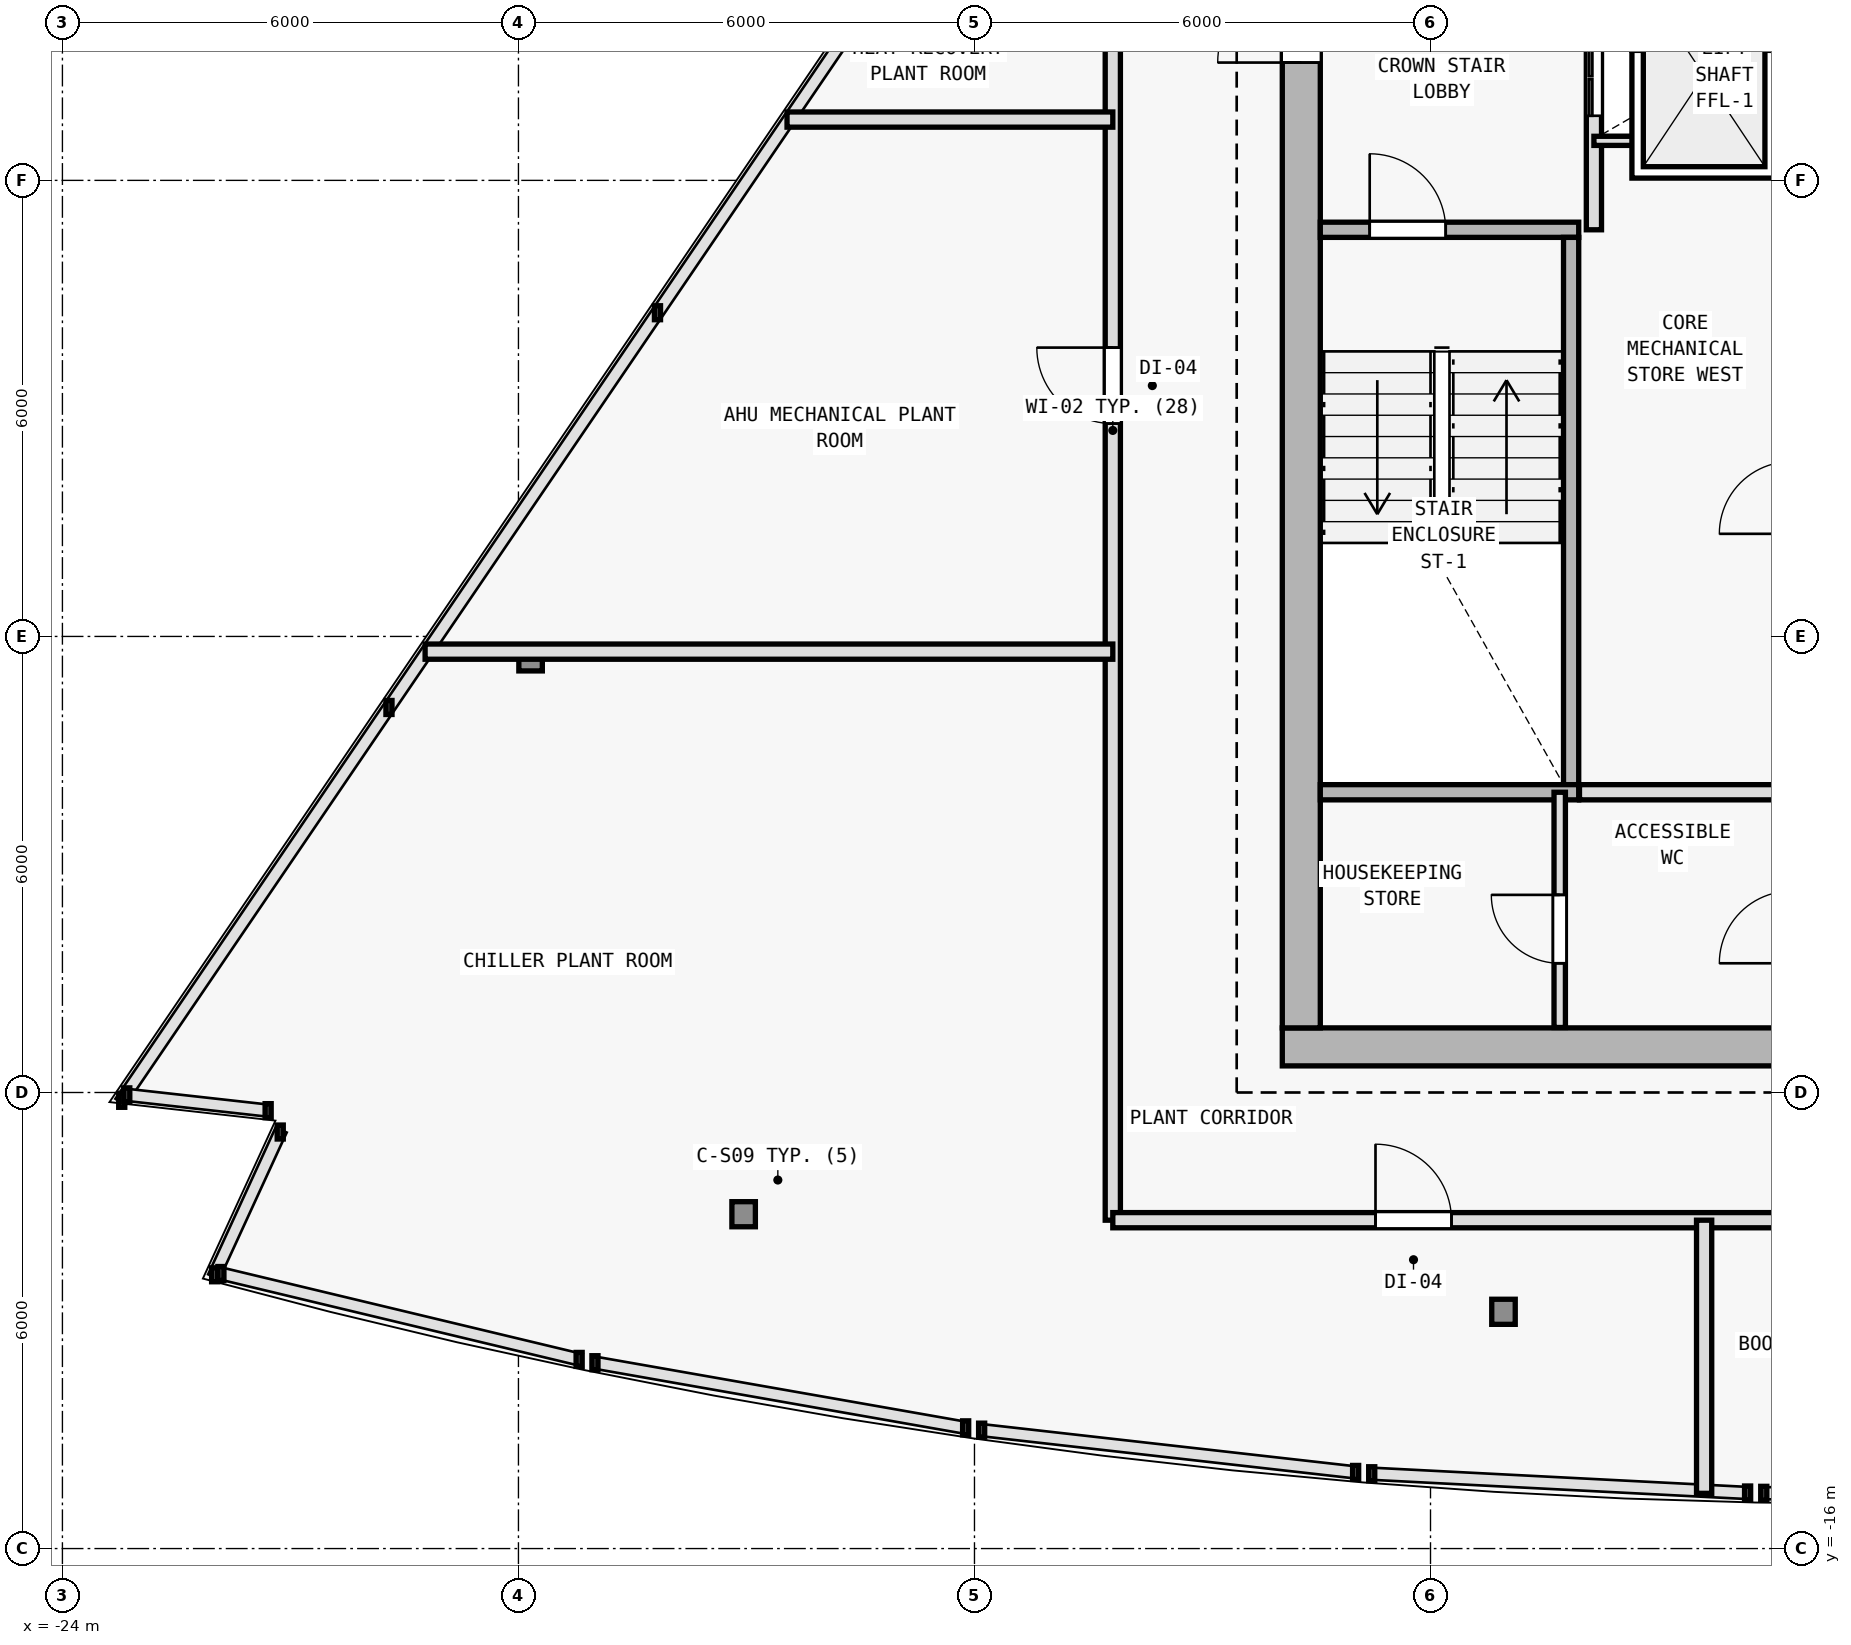
"""IFC4 building model, lengths in metres.
Left out: names, types, materials, properties, quantities, classifications, styles, units other than length and angle.
Written with IfcOpenShell. Run it as: python <this file> out.ifc"""

import sys

from ifc_helpers import new_model, si_unit, direction, frame, frame_2d, origin, origin_2d, place, context, subcontext, project, spatial, rectangle, i_section, extrude, element, fill, save


model = new_model("IFC4")
c1 = context("Model", 3, precision=1e-05, world=origin(), true_north=direction((0.0, 1.0)))
c2 = subcontext(c1, "Body", "Model", "MODEL_VIEW")
j1 = project(units=[si_unit("LENGTHUNIT", "METRE"), si_unit("PLANEANGLEUNIT", "RADIAN")], contexts=[c1])
p1 = place(None, origin())
s1 = spatial("IfcSite", under=j1, at=p1, CompositionType="ELEMENT")
p2 = place(p1, origin())
s2 = spatial("IfcBuilding", under=s1, at=p2, CompositionType="ELEMENT")
p3 = place(p2, frame((0.0, 0.0, 297.6)))
s3 = spatial("IfcBuildingStorey", under=s2, at=p3, CompositionType="ELEMENT", Elevation=297.6)
for number, where, z_axis, x_axis in (
    (1, (-7.7, -9.4, 0.0), (0.0, 0.0, 1.0), (1.0, 0.0, 0.0)),
    (2, (-7.7, 2.0, 0.0), (0.0, 0.0, 1.0), (1.0, 0.0, 0.0)),
):
    element("IfcColumn", number, at=place(p3, frame(where, z_axis=z_axis, x_axis=x_axis)), inside=s3, PredefinedType="COLUMN", context=c2, shape_type="SweptSolid", body=[
        extrude(i_section(OverallWidth=0.374, OverallDepth=0.372, WebThickness=0.012, FlangeThickness=0.02, FilletRadius=0.015, at=origin_2d()), origin(), (0.0, 0.0, 1.0), 3.6),
    ])
for number, where, z_axis, x_axis in (
    (3, (-15.037, -11.602, 0.0), (0.0, 0.0, 1.0), (1.0, 0.0, 0.0)),
    (4, (-5.04, -12.885, 0.0), (0.0, 0.0, 1.0), (1.0, 0.0, 0.0)),
    (5, (-17.84, -4.289, 0.0), (0.0, 0.0, 1.0), (1.0, 0.0, 0.0)),
):
    element("IfcColumn", number, at=place(p3, frame(where, z_axis=z_axis, x_axis=x_axis)), inside=s3, PredefinedType="COLUMN", context=c2, shape_type="SweptSolid", body=[
        extrude(i_section(OverallWidth=0.309, OverallDepth=0.33, WebThickness=0.011, FlangeThickness=0.019, FilletRadius=0.027, at=origin_2d()), origin(), (0.0, 0.0, 1.0), 3.6),
    ])
p4 = place(p3, frame((-7.95, -9.4, 0.0), z_axis=(0.0, 0.0, 1.0), x_axis=(1.0, 0.0, 0.0)))
e6 = element("IfcWall", 6, at=p4, inside=s3, PredefinedType="SHEAR", context=c2, shape_type="SweptSolid", body=[
    extrude(rectangle(XDim=15.9, YDim=0.5, at=frame_2d((7.95, 0.0))), origin(), (0.0, 0.0, 1.0), 3.34),
])
p5 = place(p4, frame((9.6, 0.0, 0.0)))
e7 = element("IfcOpeningElement", 7, at=p5, cuts=e6, PredefinedType="OPENING", context=c2, shape_type="SweptSolid", body=[
    extrude(rectangle(XDim=1.5, YDim=2.2, at=frame_2d((0.75, 1.1))), frame((0.0, 0.26, 0.0), z_axis=(0.0, -1.0, 0.0), x_axis=(1.0, 0.0, 0.0)), (0.0, 0.0, 1.0), 0.52),
])
p6 = place(p3, frame((-7.7, -9.15, 0.0), z_axis=(0.0, 0.0, 1.0), x_axis=(0.0, 1.0, 0.0)))
e8 = element("IfcWall", 8, at=p6, inside=s3, PredefinedType="SHEAR", context=c2, shape_type="SweptSolid", body=[
    extrude(rectangle(XDim=19.1, YDim=0.5, at=frame_2d((9.55, 0.0))), origin(), (0.0, 0.0, 1.0), 3.34),
])
p7 = place(p6, frame((12.7, 0.0, 0.0)))
e9 = element("IfcOpeningElement", 9, at=p7, cuts=e8, PredefinedType="OPENING", context=c2, shape_type="SweptSolid", body=[
    extrude(rectangle(XDim=1.1, YDim=2.15, at=frame_2d((0.55, 1.075))), frame((0.0, 0.26, 0.0), z_axis=(0.0, -1.0, 0.0), x_axis=(1.0, 0.0, 0.0)), (0.0, 0.0, 1.0), 0.52),
])
p8 = place(p3, frame((-7.45, 1.35, 0.0), z_axis=(0.0, 0.0, 1.0), x_axis=(1.0, 0.0, 0.0)))
e10 = element("IfcWall", 10, at=p8, inside=s3, PredefinedType="SOLIDWALL", context=c2, shape_type="SweptSolid", body=[
    extrude(rectangle(XDim=3.4, YDim=0.2, at=frame_2d((1.7, 0.0))), origin(), (0.0, 0.0, 1.0), 3.34),
])
p9 = place(p8, frame((0.65, 0.0, 0.0)))
e11 = element("IfcOpeningElement", 11, at=p9, cuts=e10, PredefinedType="OPENING", context=c2, shape_type="SweptSolid", body=[
    extrude(rectangle(XDim=1.0, YDim=2.15, at=frame_2d((0.5, 1.075))), frame((0.0, 0.11, 0.0), z_axis=(0.0, -1.0, 0.0), x_axis=(1.0, 0.0, 0.0)), (0.0, 0.0, 1.0), 0.22),
])
p10 = place(p3, frame((-4.15, -5.95, 0.0), z_axis=(0.0, 0.0, 1.0), x_axis=(0.0, 1.0, 0.0)))
e12 = element("IfcWall", 12, at=p10, inside=s3, PredefinedType="SOLIDWALL", context=c2, shape_type="SweptSolid", body=[
    extrude(rectangle(XDim=7.2, YDim=0.2, at=frame_2d((3.6, 0.0))), origin(), (0.0, 0.0, 1.0), 3.34),
])
p11 = place(p3, frame((-3.85, 1.35, 0.0), z_axis=(0.0, 0.0, 1.0), x_axis=(0.0, 1.0, 0.0)))
e13 = element("IfcWall", 13, at=p11, inside=s3, PredefinedType="SOLIDWALL", context=c2, shape_type="SweptSolid", body=[
    extrude(rectangle(XDim=8.595, YDim=0.2, at=frame_2d((4.297, 0.0))), origin(), (0.0, 0.0, 1.0), 3.34),
])
p12 = place(p11, frame((1.5, 0.0, 0.0)))
e14 = element("IfcOpeningElement", 14, at=p12, cuts=e13, PredefinedType="OPENING", context=c2, shape_type="SweptSolid", body=[
    extrude(rectangle(XDim=1.0, YDim=2.15, at=frame_2d((0.5, 1.075))), frame((0.0, 0.11, 0.0), z_axis=(0.0, -1.0, 0.0), x_axis=(1.0, 0.0, 0.0)), (0.0, 0.0, 1.0), 0.22),
])
p13 = place(p11, frame((3.18, 0.0, 0.0)))
e15 = element("IfcOpeningElement", 15, at=p13, cuts=e13, PredefinedType="OPENING", context=c2, shape_type="SweptSolid", body=[
    extrude(rectangle(XDim=1.0, YDim=2.15, at=frame_2d((0.5, 1.075))), frame((0.0, 0.11, 0.0), z_axis=(0.0, -1.0, 0.0), x_axis=(1.0, 0.0, 0.0)), (0.0, 0.0, 1.0), 0.22),
])
p14 = place(p3, frame((-3.85, 2.52, 0.0), z_axis=(0.0, 0.0, 1.0), x_axis=(1.0, 0.0, 0.0)))
e16 = element("IfcWall", 16, at=p14, inside=s3, PredefinedType="PARTITIONING", context=c2, shape_type="SweptSolid", body=[
    extrude(rectangle(XDim=2.9, YDim=0.12, at=frame_2d((1.45, 0.0))), origin(), (0.0, 0.0, 1.0), 3.34),
])
p15 = place(p3, frame((-7.45, -6.05, 0.0), z_axis=(0.0, 0.0, 1.0), x_axis=(1.0, 0.0, 0.0)))
e17 = element("IfcWall", 17, at=p15, inside=s3, PredefinedType="SOLIDWALL", context=c2, shape_type="SweptSolid", body=[
    extrude(rectangle(XDim=3.4, YDim=0.2, at=frame_2d((1.7, 0.0))), origin(), (0.0, 0.0, 1.0), 3.34),
])
p16 = place(p3, frame((-4.04, -6.05, 0.0), z_axis=(0.0, 0.0, 1.0), x_axis=(1.0, 0.0, 0.0)))
e18 = element("IfcWall", 18, at=p16, inside=s3, PredefinedType="SOLIDWALL", context=c2, shape_type="SweptSolid", body=[
    extrude(rectangle(XDim=2.79, YDim=0.2, at=frame_2d((1.395, 0.0))), origin(), (0.0, 0.0, 1.0), 3.34),
])
p17 = place(p3, frame((-4.3, -9.145, 0.0), z_axis=(0.0, 0.0, 1.0), x_axis=(0.0, 1.0, 0.0)))
e19 = element("IfcWall", 19, at=p17, inside=s3, PredefinedType="PARTITIONING", context=c2, shape_type="SweptSolid", body=[
    extrude(rectangle(XDim=3.095, YDim=0.15, at=frame_2d((1.547, 0.0))), origin(), (0.0, 0.0, 1.0), 3.34),
])
p18 = place(p17, frame((0.845, 0.0, 0.0)))
e20 = element("IfcOpeningElement", 20, at=p18, cuts=e19, PredefinedType="OPENING", context=c2, shape_type="SweptSolid", body=[
    extrude(rectangle(XDim=0.9, YDim=2.1, at=frame_2d((0.45, 1.05))), frame((0.0, 0.085, 0.0), z_axis=(0.0, -1.0, 0.0), x_axis=(1.0, 0.0, 0.0)), (0.0, 0.0, 1.0), 0.17),
])
p19 = place(p3, frame((-10.18, -11.68, 0.0), z_axis=(0.0, 0.0, 1.0), x_axis=(0.0, 1.0, 0.0)))
e21 = element("IfcWall", 21, at=p19, inside=s3, PredefinedType="SOLIDWALL", context=c2, shape_type="SweptSolid", body=[
    extrude(rectangle(XDim=20.781, YDim=0.2, at=frame_2d((10.39, 0.0))), origin(), (0.0, 0.0, 1.0), 2.995),
])
p20 = place(p19, frame((10.48, 0.0, 0.0)))
e22 = element("IfcOpeningElement", 22, at=p20, cuts=e21, PredefinedType="OPENING", context=c2, shape_type="SweptSolid", body=[
    extrude(rectangle(XDim=1.0, YDim=2.15, at=frame_2d((0.5, 1.075))), frame((0.0, 0.11, 0.0), z_axis=(0.0, -1.0, 0.0), x_axis=(1.0, 0.0, 0.0)), (0.0, 0.0, 1.0), 0.22),
])
p21 = place(p19, frame((17.064, 0.0, 0.0)))
e23 = element("IfcOpeningElement", 23, at=p21, cuts=e21, PredefinedType="OPENING", context=c2, shape_type="SweptSolid", body=[
    extrude(rectangle(XDim=1.0, YDim=2.15, at=frame_2d((0.5, 1.075))), frame((0.0, 0.11, 0.0), z_axis=(0.0, -1.0, 0.0), x_axis=(1.0, 0.0, 0.0)), (0.0, 0.0, 1.0), 0.22),
])
p22 = place(p3, frame((-10.18, -11.68, 0.0), z_axis=(0.0, 0.0, 1.0), x_axis=(1.0, 0.0, 0.0)))
e24 = element("IfcWall", 24, at=p22, inside=s3, PredefinedType="SOLIDWALL", context=c2, shape_type="SweptSolid", body=[
    extrude(rectangle(XDim=18.13, YDim=0.2, at=frame_2d((9.065, 0.0))), origin(), (0.0, 0.0, 1.0), 2.995),
])
p23 = place(p22, frame((3.456, 0.0, 0.0)))
e25 = element("IfcOpeningElement", 25, at=p23, cuts=e24, PredefinedType="OPENING", context=c2, shape_type="SweptSolid", body=[
    extrude(rectangle(XDim=1.0, YDim=2.15, at=frame_2d((0.5, 1.075))), frame((0.0, 0.11, 0.0), z_axis=(0.0, -1.0, 0.0), x_axis=(1.0, 0.0, 0.0)), (0.0, 0.0, 1.0), 0.22),
])
p24 = place(p22, frame((12.389, 0.0, 0.0)))
e26 = element("IfcOpeningElement", 26, at=p24, cuts=e24, PredefinedType="OPENING", context=c2, shape_type="SweptSolid", body=[
    extrude(rectangle(XDim=1.0, YDim=2.15, at=frame_2d((0.5, 1.075))), frame((0.0, 0.11, 0.0), z_axis=(0.0, -1.0, 0.0), x_axis=(1.0, 0.0, 0.0)), (0.0, 0.0, 1.0), 0.22),
])
p25 = place(p3, frame((-19.228, -4.2, 0.0), z_axis=(0.0, 0.0, 1.0), x_axis=(1.0, 0.0, 0.0)))
e27 = element("IfcWall", 27, at=p25, inside=s3, PredefinedType="SOLIDWALL", context=c2, shape_type="SweptSolid", body=[
    extrude(rectangle(XDim=9.048, YDim=0.2, at=frame_2d((4.524, 0.0))), origin(), (0.0, 0.0, 1.0), 2.995),
])
p26 = place(p3, frame((-14.466, 2.8, 0.0), z_axis=(0.0, 0.0, 1.0), x_axis=(1.0, 0.0, 0.0)))
e28 = element("IfcWall", 28, at=p26, inside=s3, PredefinedType="SOLIDWALL", context=c2, shape_type="SweptSolid", body=[
    extrude(rectangle(XDim=4.286, YDim=0.2, at=frame_2d((2.143, 0.0))), origin(), (0.0, 0.0, 1.0), 3.34),
])
p27 = place(p3, frame((-2.4, -15.274, 0.0), z_axis=(0.0, 0.0, 1.0), x_axis=(0.0, 1.0, 0.0)))
e29 = element("IfcWall", 29, at=p27, inside=s3, PredefinedType="SOLIDWALL", context=c2, shape_type="SweptSolid", body=[
    extrude(rectangle(XDim=3.594, YDim=0.2, at=frame_2d((1.797, 0.0))), origin(), (0.0, 0.0, 1.0), 3.34),
])
p28 = place(p7, origin())
e30 = element("IfcDoor", 30, at=p28, inside=s3, OperationType="SINGLE_SWING_LEFT", PredefinedType="DOOR", context=c2, shape_type="SweptSolid", body=[
    extrude(rectangle(XDim=1.1, YDim=2.15, at=frame_2d((0.55, 1.075))), frame((0.0, 0.025, 0.0), z_axis=(0.0, -1.0, 0.0), x_axis=(1.0, 0.0, 0.0)), (0.0, 0.0, 1.0), 0.05),
])
fill(e9, e30)
p29 = place(p9, origin())
e31 = element("IfcDoor", 31, at=p29, inside=s3, OperationType="SINGLE_SWING_LEFT", PredefinedType="DOOR", context=c2, shape_type="SweptSolid", body=[
    extrude(rectangle(XDim=1.0, YDim=2.15, at=frame_2d((0.5, 1.075))), frame((0.0, 0.025, 0.0), z_axis=(0.0, -1.0, 0.0), x_axis=(1.0, 0.0, 0.0)), (0.0, 0.0, 1.0), 0.05),
])
fill(e11, e31)
p30 = place(p12, origin())
e32 = element("IfcDoor", 32, at=p30, inside=s3, OperationType="DOUBLE_DOOR_SLIDING", PredefinedType="DOOR", context=c2, shape_type="SweptSolid", body=[
    extrude(rectangle(XDim=1.0, YDim=2.15, at=frame_2d((0.5, 1.075))), frame((0.0, 0.025, 0.0), z_axis=(0.0, -1.0, 0.0), x_axis=(1.0, 0.0, 0.0)), (0.0, 0.0, 1.0), 0.05),
])
fill(e14, e32)
p31 = place(p18, origin())
e33 = element("IfcDoor", 33, at=p31, inside=s3, OperationType="SINGLE_SWING_RIGHT", PredefinedType="DOOR", context=c2, shape_type="SweptSolid", body=[
    extrude(rectangle(XDim=0.9, YDim=2.1, at=frame_2d((0.45, 1.05))), frame((0.0, 0.025, 0.0), z_axis=(0.0, -1.0, 0.0), x_axis=(1.0, 0.0, 0.0)), (0.0, 0.0, 1.0), 0.05),
])
fill(e20, e33)
p32 = place(p20, origin())
e34 = element("IfcDoor", 34, at=p32, inside=s3, OperationType="SINGLE_SWING_RIGHT", PredefinedType="DOOR", context=c2, shape_type="SweptSolid", body=[
    extrude(rectangle(XDim=1.0, YDim=2.15, at=frame_2d((0.5, 1.075))), frame((0.0, 0.025, 0.0), z_axis=(0.0, -1.0, 0.0), x_axis=(1.0, 0.0, 0.0)), (0.0, 0.0, 1.0), 0.05),
])
fill(e22, e34)
p33 = place(p23, origin())
e35 = element("IfcDoor", 35, at=p33, inside=s3, OperationType="SINGLE_SWING_LEFT", PredefinedType="DOOR", context=c2, shape_type="SweptSolid", body=[
    extrude(rectangle(XDim=1.0, YDim=2.15, at=frame_2d((0.5, 1.075))), frame((0.0, 0.025, 0.0), z_axis=(0.0, -1.0, 0.0), x_axis=(1.0, 0.0, 0.0)), (0.0, 0.0, 1.0), 0.05),
])
fill(e25, e35)
save(model, sys.argv[1])
